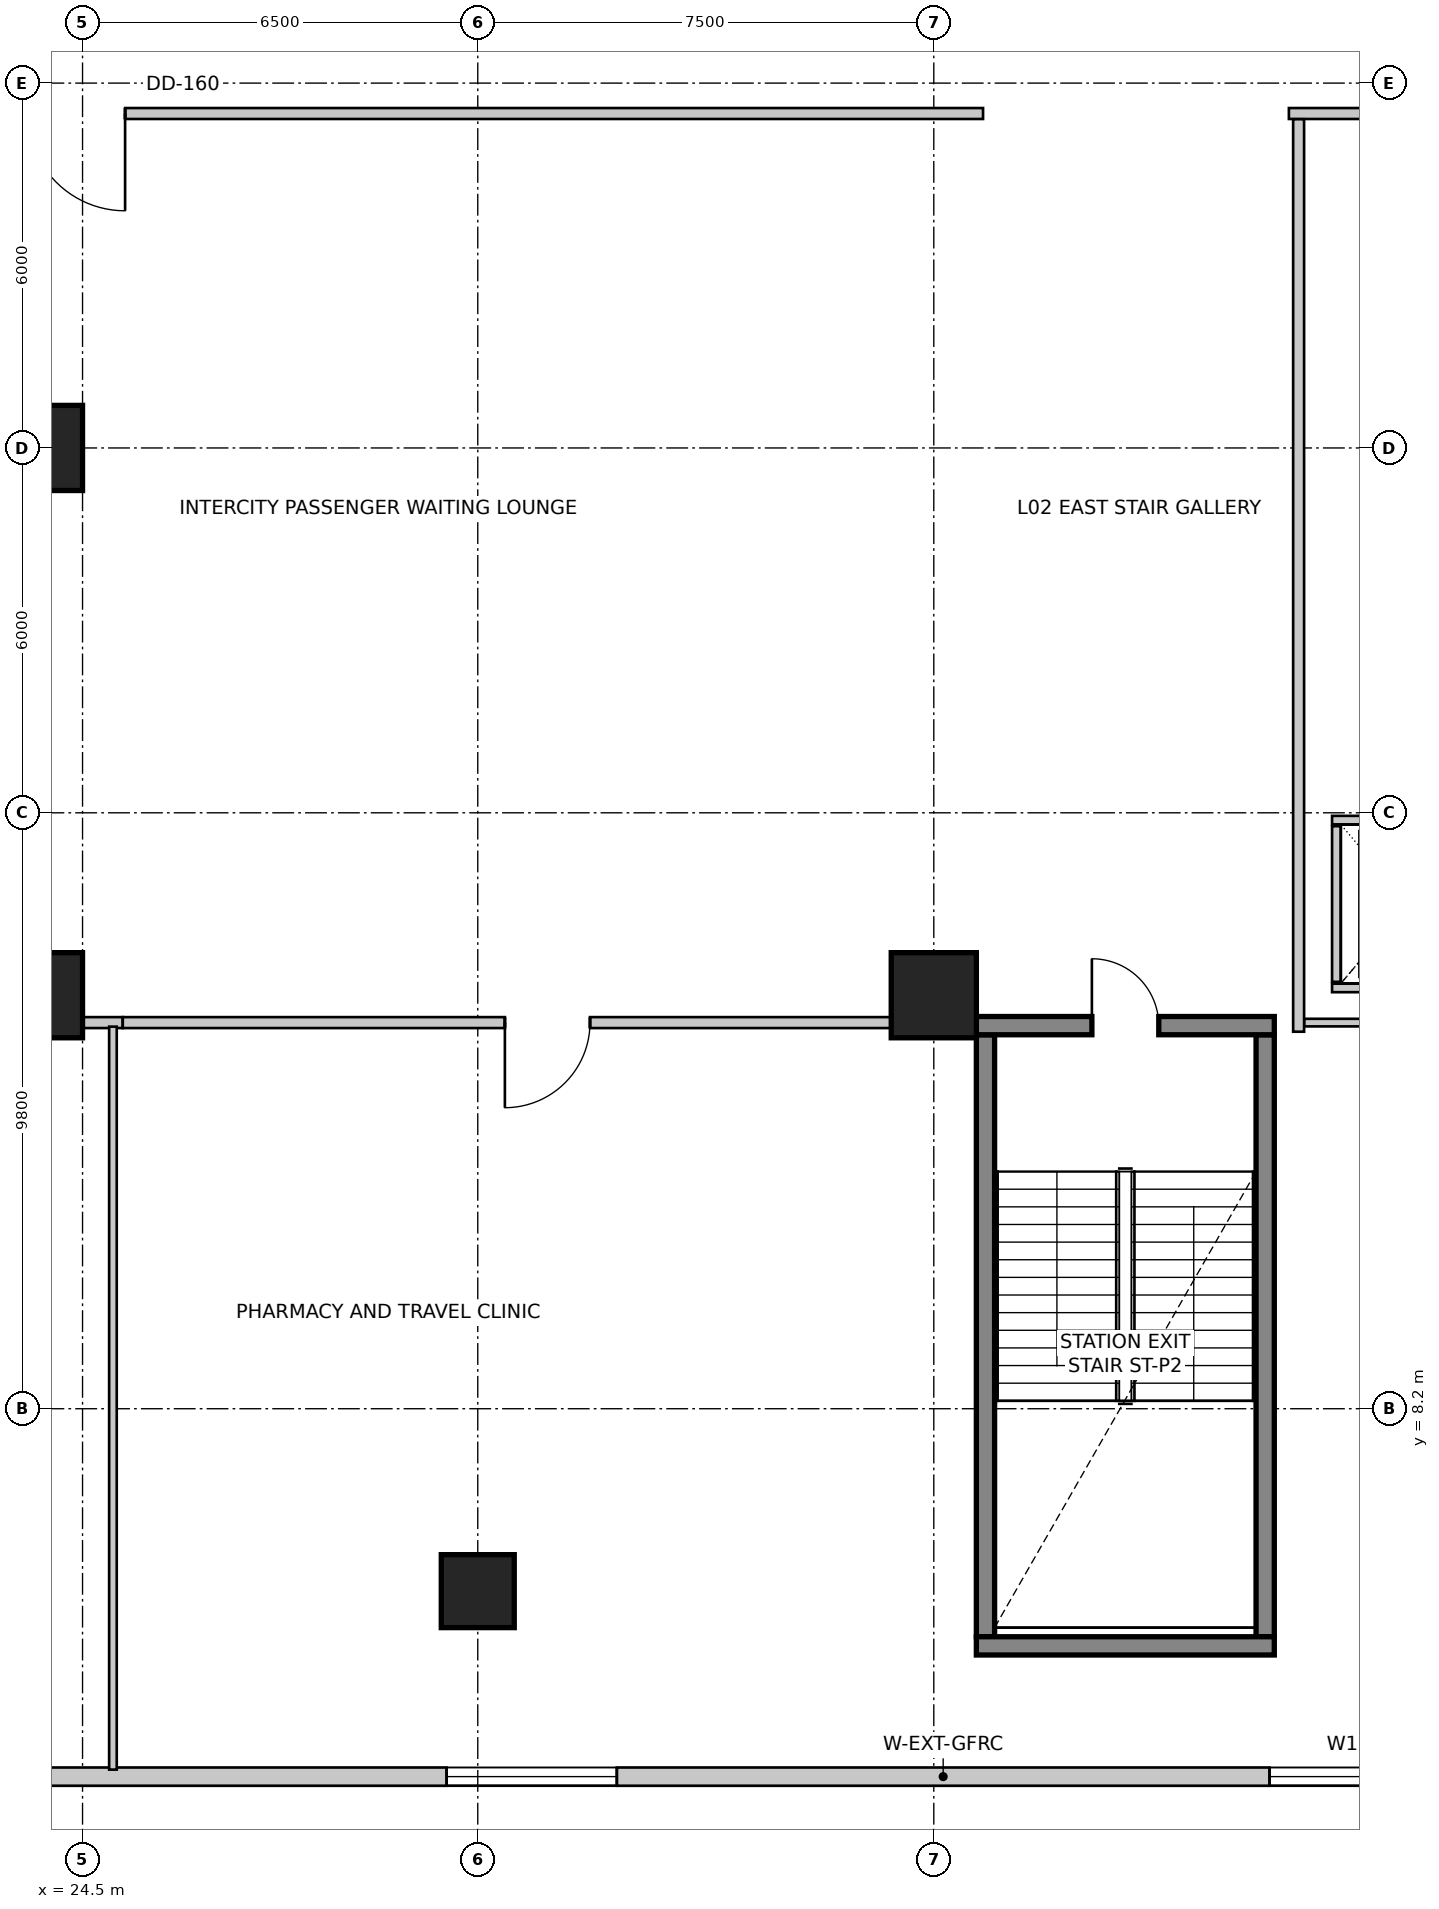
"""IFC4 building model, lengths in metres.
Left out: names, types, materials, properties, quantities, classifications, styles, units other than length and angle.
Written with IfcOpenShell. Run it as: python <this file> out.ifc"""

import sys

from ifc_helpers import new_model, si_unit, direction, frame, frame_2d, origin, origin_2d, place, context, subcontext, project, spatial, rectangle, extrude, source, transform, mapped, element, fill, save


model = new_model("IFC4")
c1 = context("Model", 3, precision=1e-05, world=origin(), true_north=direction((0.0, 1.0)))
c2 = subcontext(c1, "Body", "Model", "MODEL_VIEW")
j1 = project(units=[si_unit("LENGTHUNIT", "METRE"), si_unit("PLANEANGLEUNIT", "RADIAN")], contexts=[c1])
p1 = place(None, origin())
s1 = spatial("IfcSite", under=j1, at=p1, CompositionType="ELEMENT")
p2 = place(p1, origin())
s2 = spatial("IfcBuilding", under=s1, at=p2, CompositionType="ELEMENT")
p3 = place(p2, frame((0.0, 0.0, 6.0)))
s3 = spatial("IfcBuildingStorey", under=s2, at=p3, CompositionType="ELEMENT", Elevation=6.0)
for number, where, z_axis, x_axis in (
    (1, (39.35, 4.45, 0.0), (0.0, 0.0, 1.0), (0.0, 1.0, 0.0)),
    (2, (43.95, 4.45, 0.0), (0.0, 0.0, 1.0), (0.0, 1.0, 0.0)),
):
    element("IfcWall", number, at=place(p3, frame(where, z_axis=z_axis, x_axis=x_axis)), inside=s3, PredefinedType="SHEAR", context=c2, shape_type="SweptSolid", body=[
        extrude(rectangle(XDim=9.9, YDim=0.3, at=frame_2d((4.95, 0.0))), origin(), (0.0, 0.0, 1.0), 5.2),
    ])
p4 = place(p3, frame((39.2, 4.3, 0.0), z_axis=(0.0, 0.0, 1.0), x_axis=(1.0, 0.0, 0.0)))
e3 = element("IfcWall", 3, at=p4, inside=s3, PredefinedType="SHEAR", context=c2, shape_type="SweptSolid", body=[
    extrude(rectangle(XDim=4.9, YDim=0.3, at=frame_2d((2.45, 0.0))), origin(), (0.0, 0.0, 1.0), 5.2),
])
p5 = place(p3, frame((39.2, 14.5, 0.0), z_axis=(0.0, 0.0, 1.0), x_axis=(1.0, 0.0, 0.0)))
e4 = element("IfcWall", 4, at=p5, inside=s3, PredefinedType="SHEAR", context=c2, shape_type="SweptSolid", body=[
    extrude(rectangle(XDim=4.9, YDim=0.3, at=frame_2d((2.45, 0.0))), origin(), (0.0, 0.0, 1.0), 5.2),
])
m1 = source(origin(), c2, "Body", "SweptSolid", [
    extrude(rectangle(XDim=1.1, YDim=2.15, at=frame_2d((0.55, 1.075))), frame((0.0, 0.16, 0.0), z_axis=(0.0, -1.0, 0.0), x_axis=(1.0, 0.0, 0.0)), (0.0, 0.0, 1.0), 0.32),
])
p6 = place(p5, frame((1.9, 0.0, 0.0)))
e5 = element("IfcOpeningElement", 5, at=p6, cuts=e4, PredefinedType="OPENING", context=c2, shape_type="MappedRepresentation", body=[
    mapped(m1, transform((0.0, 0.0, 0.0), scale=1.0)),
])
m2 = source(origin(), c2, "Body", "SweptSolid", [
    extrude(rectangle(XDim=1.2, YDim=1.2, at=origin_2d()), origin(), (0.0, 0.0, 1.0), 5.2),
])
p7 = place(p3, frame((31.0, 5.2, 0.0), z_axis=(0.0, 0.0, 1.0), x_axis=(1.0, 0.0, 0.0)))
e6 = element("IfcColumn", 6, at=p7, inside=s3, PredefinedType="COLUMN", context=c2, shape_type="MappedRepresentation", body=[
    mapped(m2, transform((0.0, 0.0, 0.0), scale=1.0)),
])
m3 = source(origin(), c2, "Body", "SweptSolid", [
    extrude(rectangle(XDim=1.4, YDim=1.4, at=origin_2d()), origin(), (0.0, 0.0, 1.0), 5.2),
])
for number, where, z_axis, x_axis in (
    (7, (23.8, 15.0, 0.0), (0.0, 0.0, 1.0), (1.0, 0.0, 0.0)),
    (8, (38.5, 15.0, 0.0), (0.0, 0.0, 1.0), (1.0, 0.0, 0.0)),
    (9, (23.8, 24.0, 0.0), (0.0, 0.0, 1.0), (1.0, 0.0, 0.0)),
):
    element("IfcColumn", number, at=place(p3, frame(where, z_axis=z_axis, x_axis=x_axis)), inside=s3, PredefinedType="COLUMN", context=c2, shape_type="MappedRepresentation", body=[
        mapped(m3, transform((0.0, 0.0, 0.0), scale=1.0)),
    ])
p8 = place(p3, frame((4.457, 2.15, 0.0), z_axis=(0.0, 0.0, 1.0), x_axis=(1.0, 0.0, 0.0)))
e10 = element("IfcWall", 10, at=p8, inside=s3, PredefinedType="SOLIDWALL", context=c2, shape_type="SweptSolid", body=[
    extrude(rectangle(XDim=61.085, YDim=0.3, at=frame_2d((30.543, 0.0))), origin(), (0.0, 0.0, 1.0), 4.9),
])
m4 = source(origin(), c2, "Body", "SweptSolid", [
    extrude(rectangle(XDim=2.8, YDim=2.4, at=frame_2d((1.4, 1.2))), frame((0.0, 0.16, 0.0), z_axis=(0.0, -1.0, 0.0), x_axis=(1.0, 0.0, 0.0)), (0.0, 0.0, 1.0), 0.32),
])
p9 = place(p8, frame((2.254, 0.0, 0.85)))
e11 = element("IfcOpeningElement", 11, at=p9, cuts=e10, PredefinedType="OPENING", context=c2, shape_type="MappedRepresentation", body=[
    mapped(m4, transform((0.0, 0.0, 0.0), scale=1.0)),
])
m5 = source(origin(), c2, "Body", "SweptSolid", [
    extrude(rectangle(XDim=2.4, YDim=2.2, at=frame_2d((1.2, 1.1))), frame((0.0, 0.16, 0.0), z_axis=(0.0, -1.0, 0.0), x_axis=(1.0, 0.0, 0.0)), (0.0, 0.0, 1.0), 0.32),
])
p10 = place(p8, frame((9.121, 0.0, 0.85)))
e12 = element("IfcOpeningElement", 12, at=p10, cuts=e10, PredefinedType="OPENING", context=c2, shape_type="MappedRepresentation", body=[
    mapped(m5, transform((0.0, 0.0, 0.0), scale=1.0)),
])
p11 = place(p8, frame((15.589, 0.0, 0.85)))
e13 = element("IfcOpeningElement", 13, at=p11, cuts=e10, PredefinedType="OPENING", context=c2, shape_type="MappedRepresentation", body=[
    mapped(m4, transform((0.0, 0.0, 0.0), scale=1.0)),
])
p12 = place(p8, frame((26.03, 0.0, 0.85)))
e14 = element("IfcOpeningElement", 14, at=p12, cuts=e10, PredefinedType="OPENING", context=c2, shape_type="MappedRepresentation", body=[
    mapped(m4, transform((0.0, 0.0, 0.0), scale=1.0)),
])
p13 = place(p8, frame((39.564, 0.0, 0.85)))
e15 = element("IfcOpeningElement", 15, at=p13, cuts=e10, PredefinedType="OPENING", context=c2, shape_type="MappedRepresentation", body=[
    mapped(m5, transform((0.0, 0.0, 0.0), scale=1.0)),
])
p14 = place(p8, frame((52.698, 0.0, 0.85)))
e16 = element("IfcOpeningElement", 16, at=p14, cuts=e10, PredefinedType="OPENING", context=c2, shape_type="MappedRepresentation", body=[
    mapped(m4, transform((0.0, 0.0, 0.0), scale=1.0)),
])
p15 = place(p3, frame((45.05, 17.88, 0.0), z_axis=(0.0, 0.0, 1.0), x_axis=(1.0, 0.0, 0.0)))
e17 = element("IfcWall", 17, at=p15, inside=s3, PredefinedType="SOLIDWALL", context=c2, shape_type="SweptSolid", body=[
    extrude(rectangle(XDim=2.5, YDim=0.14, at=frame_2d((1.25, 0.0))), origin(), (0.0, 0.0, 1.0), 4.9),
])
m6 = source(origin(), c2, "Body", "SweptSolid", [
    extrude(rectangle(XDim=1.1, YDim=2.15, at=frame_2d((0.55, 1.075))), frame((0.0, 0.08, 0.0), z_axis=(0.0, -1.0, 0.0), x_axis=(1.0, 0.0, 0.0)), (0.0, 0.0, 1.0), 0.16),
])
p16 = place(p15, frame((0.7, 0.0, 0.0)))
e18 = element("IfcOpeningElement", 18, at=p16, cuts=e17, PredefinedType="OPENING", context=c2, shape_type="MappedRepresentation", body=[
    mapped(m6, transform((0.0, 0.0, 0.0), scale=1.0)),
])
p17 = place(p3, frame((45.05, 15.12, 0.0), z_axis=(0.0, 0.0, 1.0), x_axis=(1.0, 0.0, 0.0)))
e19 = element("IfcWall", 19, at=p17, inside=s3, PredefinedType="SOLIDWALL", context=c2, shape_type="SweptSolid", body=[
    extrude(rectangle(XDim=2.5, YDim=0.14, at=frame_2d((1.25, 0.0))), origin(), (0.0, 0.0, 1.0), 3.692),
])
p18 = place(p3, frame((45.12, 15.22, 0.0), z_axis=(0.0, 0.0, 1.0), x_axis=(0.0, 1.0, 0.0)))
e20 = element("IfcWall", 20, at=p18, inside=s3, PredefinedType="SOLIDWALL", context=c2, shape_type="SweptSolid", body=[
    extrude(rectangle(XDim=2.56, YDim=0.14, at=frame_2d((1.28, 0.0))), origin(), (0.0, 0.0, 1.0), 3.692),
])
p19 = place(p3, frame((39.31, 29.5, 0.0), z_axis=(0.0, 0.0, 1.0), x_axis=(-1.0, 0.0, 0.0)))
e21 = element("IfcWall", 21, at=p19, inside=s3, PredefinedType="PARTITIONING", context=c2, shape_type="SweptSolid", body=[
    extrude(rectangle(XDim=29.82, YDim=0.18, at=frame_2d((14.91, 0.0))), origin(), (0.0, 0.0, 1.0), 4.03),
])
m7 = source(origin(), c2, "Body", "SweptSolid", [
    extrude(rectangle(XDim=1.6, YDim=2.15, at=frame_2d((0.8, 1.075))), frame((0.0, 0.1, 0.0), z_axis=(0.0, -1.0, 0.0), x_axis=(1.0, 0.0, 0.0)), (0.0, 0.0, 1.0), 0.2),
])
p20 = place(p19, frame((14.11, 0.0, 0.0)))
e22 = element("IfcOpeningElement", 22, at=p20, cuts=e21, PredefinedType="OPENING", context=c2, shape_type="MappedRepresentation", body=[
    mapped(m7, transform((0.0, 0.0, 0.0), scale=1.0)),
])
p21 = place(p3, frame((67.735, 29.5, 0.0), z_axis=(0.0, 0.0, 1.0), x_axis=(-1.0, 0.0, 0.0)))
e23 = element("IfcWall", 23, at=p21, inside=s3, PredefinedType="PARTITIONING", context=c2, shape_type="SweptSolid", body=[
    extrude(rectangle(XDim=23.395, YDim=0.18, at=frame_2d((11.698, 0.0))), origin(), (0.0, 0.0, 1.0), 3.092),
])
m8 = source(origin(), c2, "Body", "SweptSolid", [
    extrude(rectangle(XDim=1.4, YDim=2.15, at=frame_2d((0.7, 1.075))), frame((0.0, 0.1, 0.0), z_axis=(0.0, -1.0, 0.0), x_axis=(1.0, 0.0, 0.0)), (0.0, 0.0, 1.0), 0.2),
])
p22 = place(p21, frame((10.998, 0.0, 0.0)))
e24 = element("IfcOpeningElement", 24, at=p22, cuts=e23, PredefinedType="OPENING", context=c2, shape_type="MappedRepresentation", body=[
    mapped(m8, transform((0.0, 0.0, 0.0), scale=1.0)),
])
p23 = place(p3, frame((44.5, 29.406, 0.0), z_axis=(0.0, 0.0, 1.0), x_axis=(0.0, -1.0, 0.0)))
e25 = element("IfcWall", 25, at=p23, inside=s3, PredefinedType="PARTITIONING", context=c2, shape_type="SweptSolid", body=[
    extrude(rectangle(XDim=15.006, YDim=0.18, at=frame_2d((7.503, 0.0))), origin(), (0.0, 0.0, 1.0), 3.692),
])
p24 = place(p3, frame((25.16, 14.55, 0.0), z_axis=(0.0, 0.0, 1.0), x_axis=(-1.0, 0.0, 0.0)))
e26 = element("IfcWall", 26, at=p24, inside=s3, PredefinedType="PARTITIONING", context=c2, shape_type="SweptSolid", body=[
    extrude(rectangle(XDim=15.49, YDim=0.18, at=frame_2d((7.745, 0.0))), origin(), (0.0, 0.0, 1.0), 3.942),
])
p25 = place(p24, frame((5.354, 0.0, 0.0)))
e27 = element("IfcOpeningElement", 27, at=p25, cuts=e26, PredefinedType="OPENING", context=c2, shape_type="MappedRepresentation", body=[
    mapped(m8, transform((0.0, 0.0, 0.0), scale=1.0)),
])
p26 = place(p3, frame((39.13, 14.55, 0.0), z_axis=(0.0, 0.0, 1.0), x_axis=(-1.0, 0.0, 0.0)))
e28 = element("IfcWall", 28, at=p26, inside=s3, PredefinedType="PARTITIONING", context=c2, shape_type="SweptSolid", body=[
    extrude(rectangle(XDim=13.968, YDim=0.18, at=frame_2d((6.984, 0.0))), origin(), (0.0, 0.0, 1.0), 4.485),
])
p27 = place(p26, frame((6.284, 0.0, 0.0)))
e29 = element("IfcOpeningElement", 29, at=p27, cuts=e28, PredefinedType="OPENING", context=c2, shape_type="MappedRepresentation", body=[
    mapped(m8, transform((0.0, 0.0, 0.0), scale=1.0)),
])
p28 = place(p3, frame((67.735, 14.55, 0.0), z_axis=(0.0, 0.0, 1.0), x_axis=(-1.0, 0.0, 0.0)))
e30 = element("IfcWall", 30, at=p28, inside=s3, PredefinedType="PARTITIONING", context=c2, shape_type="SweptSolid", body=[
    extrude(rectangle(XDim=23.141, YDim=0.125, at=frame_2d((11.571, 0.0))), origin(), (0.0, 0.0, 1.0), 3.942),
])
m9 = source(origin(), c2, "Body", "SweptSolid", [
    extrude(rectangle(XDim=0.9, YDim=2.15, at=frame_2d((0.45, 1.075))), frame((0.0, 0.073, 0.0), z_axis=(0.0, -1.0, 0.0), x_axis=(1.0, 0.0, 0.0)), (0.0, 0.0, 1.0), 0.145),
])
p29 = place(p28, frame((11.121, 0.0, 0.0)))
e31 = element("IfcOpeningElement", 31, at=p29, cuts=e30, PredefinedType="OPENING", context=c2, shape_type="MappedRepresentation", body=[
    mapped(m9, transform((0.0, 0.0, 0.0), scale=1.0)),
])
p30 = place(p3, frame((25.0, 14.483, 0.0), z_axis=(0.0, 0.0, 1.0), x_axis=(0.0, -1.0, 0.0)))
e32 = element("IfcWall", 32, at=p30, inside=s3, PredefinedType="PARTITIONING", context=c2, shape_type="SweptSolid", body=[
    extrude(rectangle(XDim=12.219, YDim=0.125, at=frame_2d((6.109, 0.0))), origin(), (0.0, 0.0, 1.0), 3.692),
])
m10 = source(origin(), c2, "Body", "SweptSolid", [
    extrude(rectangle(XDim=2.8, YDim=2.4, at=frame_2d((1.4, 1.2))), frame((0.0, -0.015, 0.0), z_axis=(0.0, -1.0, 0.0), x_axis=(1.0, 0.0, 0.0)), (0.0, 0.0, 1.0), 0.06),
])
p31 = place(p12, origin())
e33 = element("IfcWindow", 33, at=p31, inside=s3, PartitioningType="SINGLE_PANEL", PredefinedType="WINDOW", context=c2, shape_type="MappedRepresentation", body=[
    mapped(m10, transform((0.0, 0.0, 0.0), scale=1.0)),
])
fill(e14, e33)
m11 = source(origin(), c2, "Body", "SweptSolid", [
    extrude(rectangle(XDim=2.4, YDim=2.2, at=frame_2d((1.2, 1.1))), frame((0.0, -0.015, 0.0), z_axis=(0.0, -1.0, 0.0), x_axis=(1.0, 0.0, 0.0)), (0.0, 0.0, 1.0), 0.06),
])
p32 = place(p13, origin())
e34 = element("IfcWindow", 34, at=p32, inside=s3, PartitioningType="SINGLE_PANEL", PredefinedType="WINDOW", context=c2, shape_type="MappedRepresentation", body=[
    mapped(m11, transform((0.0, 0.0, 0.0), scale=1.0)),
])
fill(e15, e34)
m12 = source(origin(), c2, "Body", "SweptSolid", [
    extrude(rectangle(XDim=1.1, YDim=2.15, at=frame_2d((0.55, 1.075))), frame((0.0, 0.025, 0.0), z_axis=(0.0, -1.0, 0.0), x_axis=(1.0, 0.0, 0.0)), (0.0, 0.0, 1.0), 0.05),
])
p33 = place(p6, origin())
e35 = element("IfcDoor", 35, at=p33, inside=s3, OperationType="SINGLE_SWING_LEFT", PredefinedType="DOOR", context=c2, shape_type="MappedRepresentation", body=[
    mapped(m12, transform((0.0, 0.0, 0.0), scale=1.0)),
])
fill(e5, e35)
m13 = source(origin(), c2, "Body", "SweptSolid", [
    extrude(rectangle(XDim=1.6, YDim=2.15, at=frame_2d((0.8, 1.075))), frame((0.0, 0.025, 0.0), z_axis=(0.0, -1.0, 0.0), x_axis=(1.0, 0.0, 0.0)), (0.0, 0.0, 1.0), 0.05),
])
p34 = place(p20, origin())
e36 = element("IfcDoor", 36, at=p34, inside=s3, OperationType="SINGLE_SWING_LEFT", PredefinedType="DOOR", context=c2, shape_type="MappedRepresentation", body=[
    mapped(m13, transform((0.0, 0.0, 0.0), scale=1.0)),
])
fill(e22, e36)
m14 = source(origin(), c2, "Body", "SweptSolid", [
    extrude(rectangle(XDim=1.4, YDim=2.15, at=frame_2d((0.7, 1.075))), frame((0.0, 0.025, 0.0), z_axis=(0.0, -1.0, 0.0), x_axis=(1.0, 0.0, 0.0)), (0.0, 0.0, 1.0), 0.05),
])
p35 = place(p27, origin())
e37 = element("IfcDoor", 37, at=p35, inside=s3, OperationType="SINGLE_SWING_RIGHT", PredefinedType="DOOR", context=c2, shape_type="MappedRepresentation", body=[
    mapped(m14, transform((0.0, 0.0, 0.0), scale=1.0)),
])
fill(e29, e37)
save(model, sys.argv[1])
